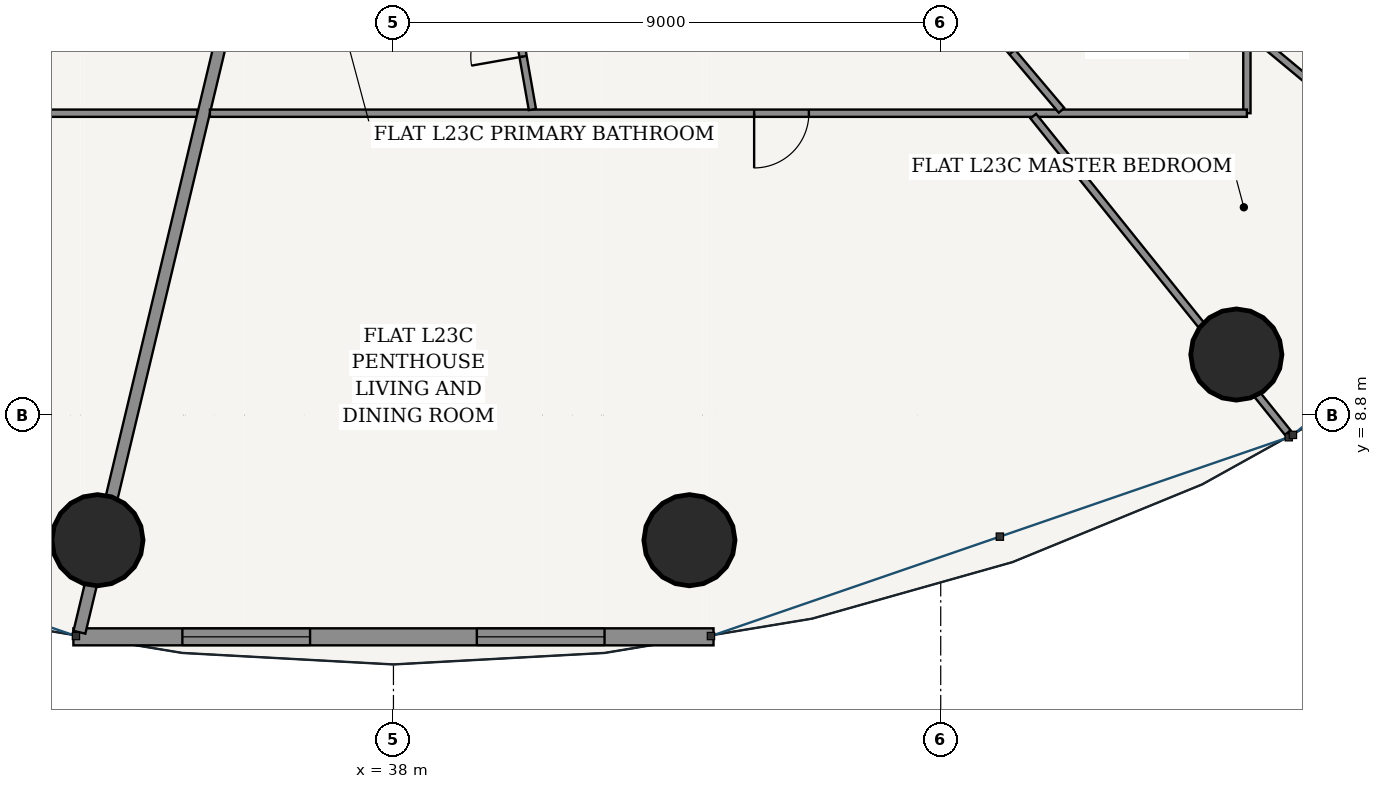
"""IFC4 building model, lengths in metres.
Left out: names, types, materials, properties, quantities, classifications, styles, units other than length and angle.
Written with IfcOpenShell. Run it as: python <this file> out.ifc"""

import sys

from ifc_helpers import new_model, si_unit, direction, frame, frame_2d, origin, origin_2d, place, context, subcontext, project, spatial, rectangle, hollow_circle, extrude, source, transform, mapped, element, fill, save


model = new_model("IFC4")
c1 = context("Model", 3, precision=1e-05, world=origin(), true_north=direction((-0.2419218956, 0.970295726276)))
c2 = subcontext(c1, "Body", "Model", "MODEL_VIEW")
j1 = project(units=[si_unit("LENGTHUNIT", "METRE"), si_unit("PLANEANGLEUNIT", "RADIAN")], contexts=[c1])
p1 = place(None, origin())
s1 = spatial("IfcSite", under=j1, at=p1, CompositionType="ELEMENT")
p2 = place(p1, origin())
s2 = spatial("IfcBuilding", under=s1, at=p2, CompositionType="ELEMENT")
p3 = place(p2, frame((0.0, 0.0, 90.6)))
s3 = spatial("IfcBuildingStorey", under=s2, at=p3, CompositionType="ELEMENT", Elevation=90.6)
for number, where, z_axis, x_axis in (
    (1, (33.133, 6.743, 0.0), (0.0, 0.0, 1.0), (1.0, 0.0, 0.0)),
    (2, (42.867, 6.743, 0.0), (0.0, 0.0, 1.0), (1.0, 0.0, 0.0)),
    (3, (51.862, 9.796, 0.0), (0.0, 0.0, 1.0), (1.0, 0.0, 0.0)),
):
    element("IfcColumn", number, at=place(p3, frame(where, z_axis=z_axis, x_axis=x_axis)), inside=s3, PredefinedType="COLUMN", context=c2, shape_type="SweptSolid", body=[
        extrude(hollow_circle(Radius=0.75, WallThickness=0.045, at=origin_2d()), origin(), (0.0, 0.0, 1.0), 3.6),
    ])
p4 = place(p3, frame((32.736, 5.154, 0.0), z_axis=(0.0, 0.0, 1.0), x_axis=(1.0, 0.0, 0.0)))
e4 = element("IfcWall", 4, at=p4, inside=s3, PredefinedType="SOLIDWALL", context=c2, shape_type="SweptSolid", body=[
    extrude(rectangle(XDim=10.527, YDim=0.28, at=frame_2d((5.264, 0.0))), origin(), (0.0, 0.0, 1.0), 3.325),
])
p5 = place(p4, frame((1.792, 0.0, 0.85)))
e5 = element("IfcOpeningElement", 5, at=p5, cuts=e4, PredefinedType="OPENING", context=c2, shape_type="SweptSolid", body=[
    extrude(rectangle(XDim=2.1, YDim=1.95, at=frame_2d((1.05, 0.975))), frame((0.0, 0.15, 0.0), z_axis=(0.0, -1.0, 0.0), x_axis=(1.0, 0.0, 0.0)), (0.0, 0.0, 1.0), 0.3),
])
p6 = place(p4, frame((6.635, 0.0, 0.85)))
e6 = element("IfcOpeningElement", 6, at=p6, cuts=e4, PredefinedType="OPENING", context=c2, shape_type="SweptSolid", body=[
    extrude(rectangle(XDim=2.1, YDim=1.95, at=frame_2d((1.05, 0.975))), frame((0.0, 0.15, 0.0), z_axis=(0.0, -1.0, 0.0), x_axis=(1.0, 0.0, 0.0)), (0.0, 0.0, 1.0), 0.3),
])
p7 = place(p3, frame((34.777, 13.765, 0.0), z_axis=(0.0, 0.0, 1.0), x_axis=(-1.0, 0.0, 0.0)))
e7 = element("IfcWall", 7, at=p7, inside=s3, PredefinedType="PARTITIONING", context=c2, shape_type="SweptSolid", body=[
    extrude(rectangle(XDim=10.812, YDim=0.12, at=frame_2d((5.406, 0.0))), origin(), (0.0, 0.0, 1.0), 2.767),
])
p8 = place(p7, frame((8.466, 0.0, 0.0)))
e8 = element("IfcOpeningElement", 8, at=p8, cuts=e7, PredefinedType="OPENING", context=c2, shape_type="SweptSolid", body=[
    extrude(rectangle(XDim=0.9, YDim=2.15, at=frame_2d((0.45, 1.075))), frame((0.0, 0.07, 0.0), z_axis=(0.0, -1.0, 0.0), x_axis=(1.0, 0.0, 0.0)), (0.0, 0.0, 1.0), 0.14),
])
p9 = place(p7, frame((2.628, 0.0, 0.0)))
e9 = element("IfcOpeningElement", 9, at=p9, cuts=e7, PredefinedType="OPENING", context=c2, shape_type="SweptSolid", body=[
    extrude(rectangle(XDim=0.9, YDim=2.15, at=frame_2d((0.45, 1.075))), frame((0.0, 0.07, 0.0), z_axis=(0.0, -1.0, 0.0), x_axis=(1.0, 0.0, 0.0)), (0.0, 0.0, 1.0), 0.14),
])
p10 = place(p3, frame((35.514, 16.415, 0.0), z_axis=(0.0, 0.0, 1.0), x_axis=(-0.232829417917, -0.972517589636, 0.0)))
e10 = element("IfcWall", 10, at=p10, inside=s3, PredefinedType="PARTITIONING", context=c2, shape_type="SweptSolid", body=[
    extrude(rectangle(XDim=11.502, YDim=0.2, at=frame_2d((5.751, 0.0))), origin(), (0.0, 0.0, 1.0), 2.767),
])
p11 = place(p3, frame((52.035, 34.49, 0.0), z_axis=(0.0, 0.0, 1.0), x_axis=(0.0, -1.0, 0.0)))
e11 = element("IfcWall", 11, at=p11, inside=s3, PredefinedType="PARTITIONING", context=c2, shape_type="SweptSolid", body=[
    extrude(rectangle(XDim=20.725, YDim=0.12, at=frame_2d((10.362, 0.0))), origin(), (0.0, 0.0, 1.0), 2.767),
])
p12 = place(p11, frame((17.493, 0.0, 0.0)))
e12 = element("IfcOpeningElement", 12, at=p12, cuts=e11, PredefinedType="OPENING", context=c2, shape_type="SweptSolid", body=[
    extrude(rectangle(XDim=0.9, YDim=2.15, at=frame_2d((0.45, 1.075))), frame((0.0, 0.07, 0.0), z_axis=(0.0, -1.0, 0.0), x_axis=(1.0, 0.0, 0.0)), (0.0, 0.0, 1.0), 0.14),
])
p13 = place(p11, frame((14.064, 0.0, 0.0)))
e13 = element("IfcOpeningElement", 13, at=p13, cuts=e11, PredefinedType="OPENING", context=c2, shape_type="SweptSolid", body=[
    extrude(rectangle(XDim=0.9, YDim=2.15, at=frame_2d((0.45, 1.075))), frame((0.0, 0.07, 0.0), z_axis=(0.0, -1.0, 0.0), x_axis=(1.0, 0.0, 0.0)), (0.0, 0.0, 1.0), 0.14),
])
p14 = place(p3, frame((52.035, 13.765, 0.0), z_axis=(0.0, 0.0, 1.0), x_axis=(-1.0, 0.0, 0.0)))
e14 = element("IfcWall", 14, at=p14, inside=s3, PredefinedType="PARTITIONING", context=c2, shape_type="SweptSolid", body=[
    extrude(rectangle(XDim=17.054, YDim=0.12, at=frame_2d((8.527, 0.0))), origin(), (0.0, 0.0, 1.0), 2.767),
])
p15 = place(p14, frame((7.203, 0.0, 0.0)))
e15 = element("IfcOpeningElement", 15, at=p15, cuts=e14, PredefinedType="OPENING", context=c2, shape_type="SweptSolid", body=[
    extrude(rectangle(XDim=0.9, YDim=2.15, at=frame_2d((0.45, 1.075))), frame((0.0, 0.07, 0.0), z_axis=(0.0, -1.0, 0.0), x_axis=(1.0, 0.0, 0.0)), (0.0, 0.0, 1.0), 0.14),
])
p16 = place(p3, frame((48.522, 13.717, 0.0), z_axis=(0.0, 0.0, 1.0), x_axis=(0.626707979732, -0.77925419995, 0.0)))
e16 = element("IfcWall", 16, at=p16, inside=s3, PredefinedType="PARTITIONING", context=c2, shape_type="SweptSolid", body=[
    extrude(rectangle(XDim=6.679, YDim=0.12, at=frame_2d((3.339, 0.0))), origin(), (0.0, 0.0, 1.0), 2.767),
])
p17 = place(p3, frame((52.083, 15.1, 0.0), z_axis=(0.0, 0.0, 1.0), x_axis=(0.769161827891, -0.63905405289, 0.0)))
e17 = element("IfcWall", 17, at=p17, inside=s3, PredefinedType="PARTITIONING", context=c2, shape_type="SweptSolid", body=[
    extrude(rectangle(XDim=6.08, YDim=0.12, at=frame_2d((3.04, 0.0))), origin(), (0.0, 0.0, 1.0), 2.767),
])
p18 = place(p17, frame((2.59, 0.0, 0.0)))
e18 = element("IfcOpeningElement", 18, at=p18, cuts=e17, PredefinedType="OPENING", context=c2, shape_type="SweptSolid", body=[
    extrude(rectangle(XDim=0.9, YDim=2.15, at=frame_2d((0.45, 1.075))), frame((0.0, 0.07, 0.0), z_axis=(0.0, -1.0, 0.0), x_axis=(1.0, 0.0, 0.0)), (0.0, 0.0, 1.0), 0.14),
])
p19 = place(p3, frame((39.829, 16.415, 0.0), z_axis=(0.0, 0.0, 1.0), x_axis=(0.173488627881, -0.984835872618, 0.0)))
e19 = element("IfcWall", 19, at=p19, inside=s3, PredefinedType="PARTITIONING", context=c2, shape_type="SweptSolid", body=[
    extrude(rectangle(XDim=2.629, YDim=0.12, at=frame_2d((1.314, 0.0))), origin(), (0.0, 0.0, 1.0), 3.325),
])
p20 = place(p19, frame((0.885, 0.0, 0.0)))
e20 = element("IfcOpeningElement", 20, at=p20, cuts=e19, PredefinedType="OPENING", context=c2, shape_type="SweptSolid", body=[
    extrude(rectangle(XDim=0.86, YDim=2.15, at=frame_2d((0.43, 1.075))), frame((0.0, 0.07, 0.0), z_axis=(0.0, -1.0, 0.0), x_axis=(1.0, 0.0, 0.0)), (0.0, 0.0, 1.0), 0.14),
])
p21 = place(p3, frame((46.785, 16.415, 0.0), z_axis=(0.0, 0.0, 1.0), x_axis=(0.64582345164, -0.76348678398, 0.0)))
e21 = element("IfcWall", 21, at=p21, inside=s3, PredefinedType="PARTITIONING", context=c2, shape_type="SweptSolid", body=[
    extrude(rectangle(XDim=3.409, YDim=0.12, at=frame_2d((1.705, 0.0))), origin(), (0.0, 0.0, 1.0), 3.004),
])
p22 = place(p21, frame((1.254, 0.0, 0.0)))
e22 = element("IfcOpeningElement", 22, at=p22, cuts=e21, PredefinedType="OPENING", context=c2, shape_type="SweptSolid", body=[
    extrude(rectangle(XDim=0.9, YDim=2.15, at=frame_2d((0.45, 1.075))), frame((0.0, 0.07, 0.0), z_axis=(0.0, -1.0, 0.0), x_axis=(1.0, 0.0, 0.0)), (0.0, 0.0, 1.0), 0.14),
])
m1 = source(origin(), c2, "Body", "SweptSolid", [
    extrude(rectangle(XDim=2.1, YDim=1.95, at=frame_2d((1.05, 0.975))), frame((0.0, 0.03, 0.0), z_axis=(0.0, -1.0, 0.0), x_axis=(1.0, 0.0, 0.0)), (0.0, 0.0, 1.0), 0.06),
])
p23 = place(p5, origin())
e23 = element("IfcWindow", 23, at=p23, inside=s3, PartitioningType="SINGLE_PANEL", PredefinedType="WINDOW", context=c2, shape_type="MappedRepresentation", body=[
    mapped(m1, transform((0.0, 0.0, 0.0), scale=1.0)),
])
fill(e5, e23)
p24 = place(p6, origin())
e24 = element("IfcWindow", 24, at=p24, inside=s3, PartitioningType="SINGLE_PANEL", PredefinedType="WINDOW", context=c2, shape_type="MappedRepresentation", body=[
    mapped(m1, transform((0.0, 0.0, 0.0), scale=1.0)),
])
fill(e6, e24)
m2 = source(origin(), c2, "Body", "SweptSolid", [
    extrude(rectangle(XDim=0.86, YDim=2.15, at=frame_2d((0.43, 1.075))), frame((0.0, 0.025, 0.0), z_axis=(0.0, -1.0, 0.0), x_axis=(1.0, 0.0, 0.0)), (0.0, 0.0, 1.0), 0.05),
])
p25 = place(p20, frame((0.86, 0.0, 0.0), z_axis=(0.0, 0.0, 1.0), x_axis=(-1.0, 0.0, 0.0)))
e25 = element("IfcDoor", 25, at=p25, inside=s3, OperationType="SINGLE_SWING_LEFT", PredefinedType="DOOR", context=c2, shape_type="MappedRepresentation", body=[
    mapped(m2, transform((0.0, 0.0, 0.0), scale=1.0)),
])
fill(e20, e25)
m3 = source(origin(), c2, "Body", "SweptSolid", [
    extrude(rectangle(XDim=0.9, YDim=2.15, at=frame_2d((0.45, 1.075))), frame((0.0, 0.025, 0.0), z_axis=(0.0, -1.0, 0.0), x_axis=(1.0, 0.0, 0.0)), (0.0, 0.0, 1.0), 0.05),
])
p26 = place(p15, origin())
e26 = element("IfcDoor", 26, at=p26, inside=s3, OperationType="SINGLE_SWING_RIGHT", PredefinedType="DOOR", context=c2, shape_type="MappedRepresentation", body=[
    mapped(m3, transform((0.0, 0.0, 0.0), scale=1.0)),
])
fill(e15, e26)
p27 = place(p22, origin())
e27 = element("IfcDoor", 27, at=p27, inside=s3, OperationType="SINGLE_SWING_LEFT", PredefinedType="DOOR", context=c2, shape_type="MappedRepresentation", body=[
    mapped(m3, transform((0.0, 0.0, 0.0), scale=1.0)),
])
fill(e22, e27)
save(model, sys.argv[1])
